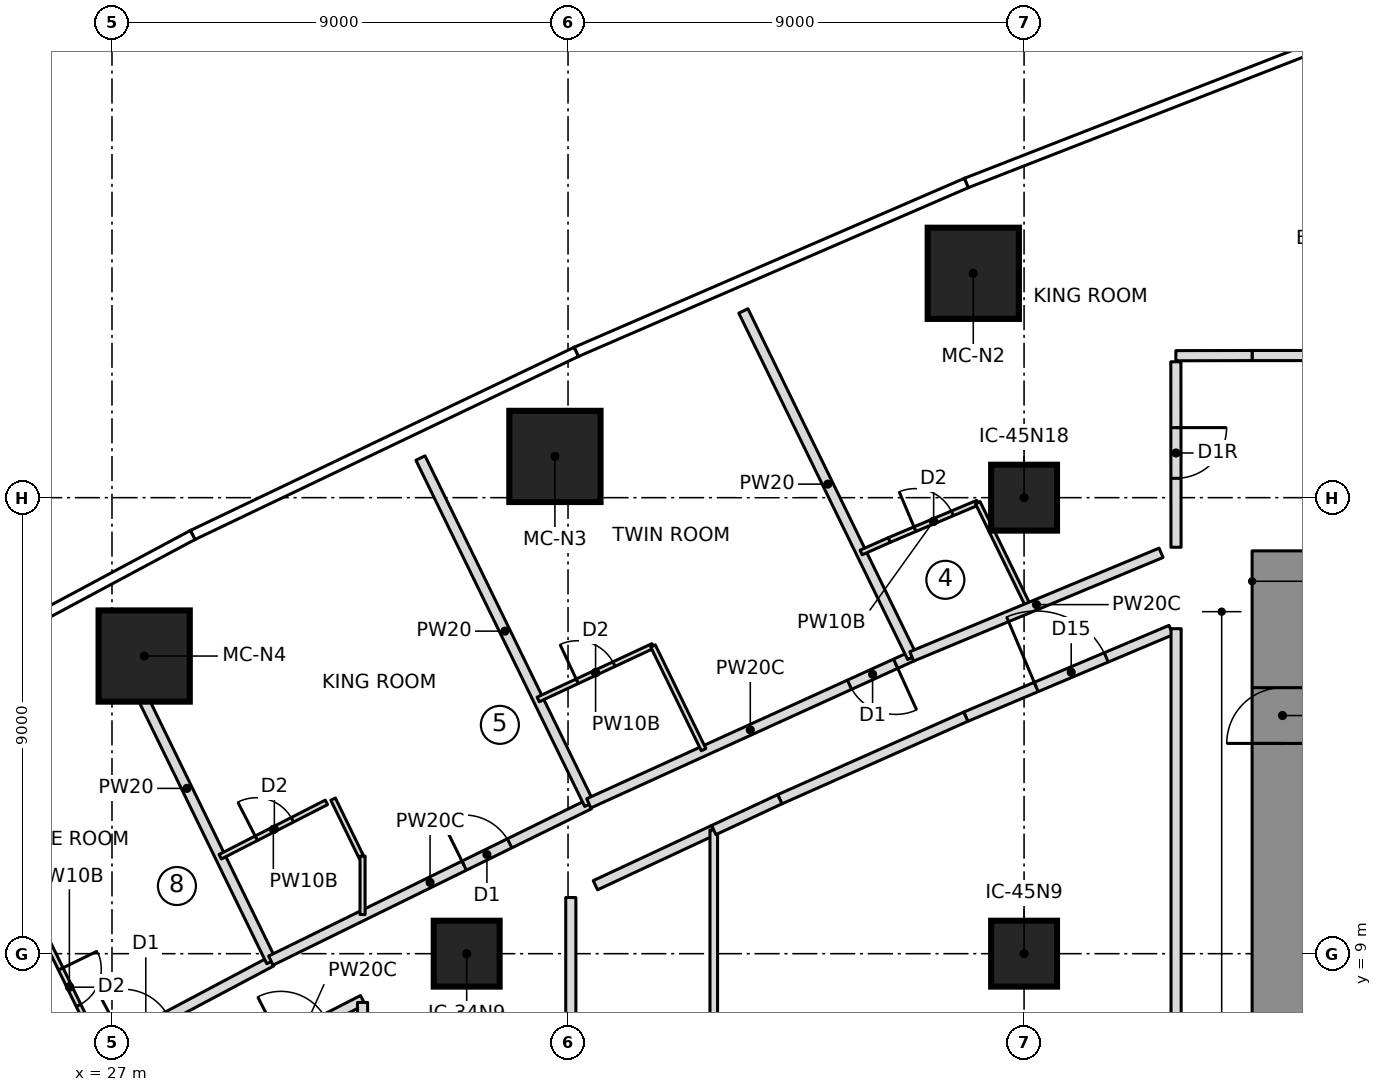
"""IFC4 building model, lengths in metres.
Left out: names, types, materials, properties, quantities, classifications, styles, units other than length and angle.
Written with IfcOpenShell. Run it as: python <this file> out.ifc"""

import sys

from ifc_helpers import new_model, si_unit, direction, frame, frame_2d, origin, origin_2d, place, context, subcontext, project, spatial, rectangle, extrude, element, fill, save


model = new_model("IFC4")
c1 = context("Model", 3, precision=1e-05, world=origin(), true_north=direction((0.0, 1.0)))
c2 = subcontext(c1, "Body", "Model", "MODEL_VIEW")
j1 = project(units=[si_unit("LENGTHUNIT", "METRE"), si_unit("PLANEANGLEUNIT", "RADIAN")], contexts=[c1])
p1 = place(None, origin())
s1 = spatial("IfcSite", under=j1, at=p1, CompositionType="ELEMENT")
p2 = place(p1, origin())
s2 = spatial("IfcBuilding", under=s1, at=p2, CompositionType="ELEMENT")
p3 = place(p2, frame((0.0, 0.0, 68.0)))
s3 = spatial("IfcBuildingStorey", under=s2, at=p3, CompositionType="ELEMENT", Elevation=68.0)
p4 = place(p3, frame((50.1, 6.65, 0.0), z_axis=(0.0, 0.0, 1.0), x_axis=(0.0, 1.0, 0.0)))
e1 = element("IfcWall", 1, at=p4, inside=s3, PredefinedType="SHEAR", context=c2, shape_type="SweptSolid", body=[
    extrude(rectangle(XDim=10.3, YDim=1.2, at=frame_2d((5.15, 0.0))), origin(), (0.0, 0.0, 1.0), 3.55),
])
p5 = place(p4, frame((6.5, 0.0, 0.0)))
e2 = element("IfcOpeningElement", 2, at=p5, cuts=e1, PredefinedType="OPENING", context=c2, shape_type="SweptSolid", body=[
    extrude(rectangle(XDim=1.1, YDim=2.1, at=frame_2d((0.55, 1.05))), frame((0.0, 0.61, 0.0), z_axis=(0.0, -1.0, 0.0), x_axis=(1.0, 0.0, 0.0)), (0.0, 0.0, 1.0), 1.22),
])
for number, where, z_axis, x_axis in (
    (3, (43.998, 22.428, 0.0), (0.0, 0.0, 1.0), (1.0, 0.0, 0.0)),
    (4, (35.741, 18.814, 0.0), (0.0, 0.0, 1.0), (1.0, 0.0, 0.0)),
    (5, (27.635, 14.874, 0.0), (0.0, 0.0, 1.0), (1.0, 0.0, 0.0)),
):
    element("IfcColumn", number, at=place(p3, frame(where, z_axis=z_axis, x_axis=x_axis)), inside=s3, PredefinedType="COLUMN", context=c2, shape_type="SweptSolid", body=[
        extrude(rectangle(XDim=1.8, YDim=1.8, at=origin_2d()), origin(), (0.0, 0.0, 1.0), 3.55),
    ])
for number, where, z_axis, x_axis in (
    (6, (34.0, 9.0, 0.0), (0.0, 0.0, 1.0), (1.0, 0.0, 0.0)),
    (7, (45.0, 9.0, 0.0), (0.0, 0.0, 1.0), (1.0, 0.0, 0.0)),
    (8, (45.0, 18.0, 0.0), (0.0, 0.0, 1.0), (1.0, 0.0, 0.0)),
):
    element("IfcColumn", number, at=place(p3, frame(where, z_axis=z_axis, x_axis=x_axis)), inside=s3, PredefinedType="COLUMN", context=c2, shape_type="SweptSolid", body=[
        extrude(rectangle(XDim=1.3, YDim=1.3, at=origin_2d()), origin(), (0.0, 0.0, 1.0), 3.55),
    ])
p6 = place(p3, frame((23.957, 5.564, 0.0), z_axis=(0.0, 0.0, 1.0), x_axis=(0.883455325405, 0.468515408513, 0.0)))
e9 = element("IfcWall", 9, at=p6, inside=s3, PredefinedType="PARTITIONING", context=c2, shape_type="SweptSolid", body=[
    extrude(rectangle(XDim=7.004, YDim=0.2, at=frame_2d((3.502, 0.0))), origin(), (0.0, 0.0, 1.0), 3.25),
])
p7 = place(p6, frame((3.7, 0.0, 0.0)))
e10 = element("IfcOpeningElement", 10, at=p7, cuts=e9, PredefinedType="OPENING", context=c2, shape_type="SweptSolid", body=[
    extrude(rectangle(XDim=1.0, YDim=2.1, at=frame_2d((0.5, 1.05))), frame((0.0, 0.11, 0.0), z_axis=(0.0, -1.0, 0.0), x_axis=(1.0, 0.0, 0.0)), (0.0, 0.0, 1.0), 0.22),
])
p8 = place(p3, frame((25.55, 9.597, 0.0), z_axis=(0.0, 0.0, 1.0), x_axis=(0.43822975423, -0.898862994292, 0.0)))
e11 = element("IfcWall", 11, at=p8, inside=s3, PredefinedType="PARTITIONING", context=c2, shape_type="SweptSolid", body=[
    extrude(rectangle(XDim=2.779, YDim=0.1, at=frame_2d((1.389, 0.0))), origin(), (0.0, 0.0, 1.0), 3.25),
])
p9 = place(p8, frame((1.0, 0.0, 0.0)))
e12 = element("IfcOpeningElement", 12, at=p9, cuts=e11, PredefinedType="OPENING", context=c2, shape_type="SweptSolid", body=[
    extrude(rectangle(XDim=0.8, YDim=2.1, at=frame_2d((0.4, 1.05))), frame((0.0, 0.06, 0.0), z_axis=(0.0, -1.0, 0.0), x_axis=(1.0, 0.0, 0.0)), (0.0, 0.0, 1.0), 0.12),
])
p10 = place(p3, frame((30.144, 8.846, 0.0), z_axis=(0.0, 0.0, 1.0), x_axis=(-0.438185054829, 0.898884785567, 0.0)))
e13 = element("IfcWall", 13, at=p10, inside=s3, PredefinedType="PARTITIONING", context=c2, shape_type="SweptSolid", body=[
    extrude(rectangle(XDim=7.601, YDim=0.2, at=frame_2d((3.801, 0.0))), origin(), (0.0, 0.0, 1.0), 3.25),
])
p11 = place(p3, frame((30.135, 8.864, 0.0), z_axis=(0.0, 0.0, 1.0), x_axis=(0.897599118183, 0.44081268475, 0.0)))
e14 = element("IfcWall", 14, at=p11, inside=s3, PredefinedType="PARTITIONING", context=c2, shape_type="SweptSolid", body=[
    extrude(rectangle(XDim=7.0, YDim=0.2, at=frame_2d((3.5, 0.0))), origin(), (0.0, 0.0, 1.0), 3.25),
])
p12 = place(p11, frame((4.25, 0.0, 0.0)))
e15 = element("IfcOpeningElement", 15, at=p12, cuts=e14, PredefinedType="OPENING", context=c2, shape_type="SweptSolid", body=[
    extrude(rectangle(XDim=1.0, YDim=2.1, at=frame_2d((0.5, 1.05))), frame((0.0, 0.11, 0.0), z_axis=(0.0, -1.0, 0.0), x_axis=(1.0, 0.0, 0.0)), (0.0, 0.0, 1.0), 0.22),
])
p13 = place(p3, frame((29.136, 10.914, 0.0), z_axis=(0.0, 0.0, 1.0), x_axis=(0.890219804082, 0.45553122881, 0.0)))
e16 = element("IfcWall", 16, at=p13, inside=s3, PredefinedType="PARTITIONING", context=c2, shape_type="SweptSolid", body=[
    extrude(rectangle(XDim=2.354, YDim=0.1, at=frame_2d((1.177, 0.0))), origin(), (0.0, 0.0, 1.0), 3.25),
])
p14 = place(p13, frame((0.8, 0.0, 0.0)))
e17 = element("IfcOpeningElement", 17, at=p14, cuts=e16, PredefinedType="OPENING", context=c2, shape_type="SweptSolid", body=[
    extrude(rectangle(XDim=0.8, YDim=2.1, at=frame_2d((0.4, 1.05))), frame((0.0, 0.06, 0.0), z_axis=(0.0, -1.0, 0.0), x_axis=(1.0, 0.0, 0.0)), (0.0, 0.0, 1.0), 0.12),
])
p15 = place(p3, frame((31.363, 12.05, 0.0), z_axis=(0.0, 0.0, 1.0), x_axis=(0.438356099343, -0.898801385273, 0.0)))
e18 = element("IfcWall", 18, at=p15, inside=s3, PredefinedType="PARTITIONING", context=c2, shape_type="SweptSolid", body=[
    extrude(rectangle(XDim=1.282, YDim=0.1, at=frame_2d((0.641, 0.0))), origin(), (0.0, 0.0, 1.0), 3.25),
])
p16 = place(p3, frame((36.419, 11.949, 0.0), z_axis=(0.0, 0.0, 1.0), x_axis=(-0.438197705697, 0.898878618459, 0.0)))
e19 = element("IfcWall", 19, at=p16, inside=s3, PredefinedType="PARTITIONING", context=c2, shape_type="SweptSolid", body=[
    extrude(rectangle(XDim=7.601, YDim=0.2, at=frame_2d((3.801, 0.0))), origin(), (0.0, 0.0, 1.0), 3.25),
])
p17 = place(p3, frame((42.784, 14.867, 0.0), z_axis=(0.0, 0.0, 1.0), x_axis=(-0.910238677692, -0.414083988622, 0.0)))
e20 = element("IfcWall", 20, at=p17, inside=s3, PredefinedType="PARTITIONING", context=c2, shape_type="SweptSolid", body=[
    extrude(rectangle(XDim=7.003, YDim=0.2, at=frame_2d((3.501, 0.0))), origin(), (0.0, 0.0, 1.0), 3.25),
])
p18 = place(p17, frame((0.35, 0.0, 0.0)))
e21 = element("IfcOpeningElement", 21, at=p18, cuts=e20, PredefinedType="OPENING", context=c2, shape_type="SweptSolid", body=[
    extrude(rectangle(XDim=1.0, YDim=2.1, at=frame_2d((0.5, 1.05))), frame((0.0, 0.11, 0.0), z_axis=(0.0, -1.0, 0.0), x_axis=(1.0, 0.0, 0.0)), (0.0, 0.0, 1.0), 0.22),
])
p19 = place(p3, frame((35.411, 14.017, 0.0), z_axis=(0.0, 0.0, 1.0), x_axis=(0.906317797926, 0.422596792655, 0.0)))
e22 = element("IfcWall", 22, at=p19, inside=s3, PredefinedType="PARTITIONING", context=c2, shape_type="SweptSolid", body=[
    extrude(rectangle(XDim=2.5, YDim=0.1, at=frame_2d((1.25, 0.0))), origin(), (0.0, 0.0, 1.0), 3.25),
])
p20 = place(p19, frame((0.85, 0.0, 0.0)))
e23 = element("IfcOpeningElement", 23, at=p20, cuts=e22, PredefinedType="OPENING", context=c2, shape_type="SweptSolid", body=[
    extrude(rectangle(XDim=0.8, YDim=2.1, at=frame_2d((0.4, 1.05))), frame((0.0, 0.06, 0.0), z_axis=(0.0, -1.0, 0.0), x_axis=(1.0, 0.0, 0.0)), (0.0, 0.0, 1.0), 0.12),
])
p21 = place(p3, frame((37.677, 15.073, 0.0), z_axis=(0.0, 0.0, 1.0), x_axis=(0.43818492173, -0.89888485045, 0.0)))
e24 = element("IfcWall", 24, at=p21, inside=s3, PredefinedType="PARTITIONING", context=c2, shape_type="SweptSolid", body=[
    extrude(rectangle(XDim=2.277, YDim=0.1, at=frame_2d((1.139, 0.0))), origin(), (0.0, 0.0, 1.0), 3.25),
])
p22 = place(p3, frame((42.793, 14.849, 0.0), z_axis=(0.0, 0.0, 1.0), x_axis=(-0.438214892445, 0.898870239823, 0.0)))
e25 = element("IfcWall", 25, at=p22, inside=s3, PredefinedType="PARTITIONING", context=c2, shape_type="SweptSolid", body=[
    extrude(rectangle(XDim=7.605, YDim=0.2, at=frame_2d((3.802, 0.0))), origin(), (0.0, 0.0, 1.0), 3.25),
])
p23 = place(p3, frame((41.784, 16.918, 0.0), z_axis=(0.0, 0.0, 1.0), x_axis=(0.913894320415, 0.405952178357, 0.0)))
e26 = element("IfcWall", 26, at=p23, inside=s3, PredefinedType="PARTITIONING", context=c2, shape_type="SweptSolid", body=[
    extrude(rectangle(XDim=0.608, YDim=0.1, at=frame_2d((0.304, 0.0))), origin(), (0.0, 0.0, 1.0), 3.25),
])
p24 = place(p3, frame((42.34, 17.165, 0.0), z_axis=(0.0, 0.0, 1.0), x_axis=(0.921263923232, 0.38893802045, 0.0)))
e27 = element("IfcWall", 27, at=p24, inside=s3, PredefinedType="PARTITIONING", context=c2, shape_type="SweptSolid", body=[
    extrude(rectangle(XDim=1.895, YDim=0.1, at=frame_2d((0.948, 0.0))), origin(), (0.0, 0.0, 1.0), 3.25),
])
p25 = place(p24, frame((0.55, 0.0, 0.0)))
e28 = element("IfcOpeningElement", 28, at=p25, cuts=e27, PredefinedType="OPENING", context=c2, shape_type="SweptSolid", body=[
    extrude(rectangle(XDim=0.8, YDim=2.1, at=frame_2d((0.4, 1.05))), frame((0.0, 0.06, 0.0), z_axis=(0.0, -1.0, 0.0), x_axis=(1.0, 0.0, 0.0)), (0.0, 0.0, 1.0), 0.12),
])
p26 = place(p3, frame((44.086, 17.902, 0.0), z_axis=(0.0, 0.0, 1.0), x_axis=(0.438279975423, -0.898838507822, 0.0)))
e29 = element("IfcWall", 29, at=p26, inside=s3, PredefinedType="PARTITIONING", context=c2, shape_type="SweptSolid", body=[
    extrude(rectangle(XDim=0.603, YDim=0.1, at=frame_2d((0.301, 0.0))), origin(), (0.0, 0.0, 1.0), 3.25),
])
p27 = place(p3, frame((44.355, 17.35, 0.0), z_axis=(0.0, 0.0, 1.0), x_axis=(0.438227394636, -0.89886414468, 0.0)))
e30 = element("IfcWall", 30, at=p27, inside=s3, PredefinedType="PARTITIONING", context=c2, shape_type="SweptSolid", body=[
    extrude(rectangle(XDim=1.667, YDim=0.1, at=frame_2d((0.833, 0.0))), origin(), (0.0, 0.0, 1.0), 3.25),
])
p28 = place(p3, frame((29.604, 6.884, 0.0), z_axis=(0.0, 0.0, 1.0), x_axis=(0.890220210981, 0.455530433628, 0.0)))
e31 = element("IfcWall", 31, at=p28, inside=s3, PredefinedType="PARTITIONING", context=c2, shape_type="SweptSolid", body=[
    extrude(rectangle(XDim=2.636, YDim=0.2, at=frame_2d((1.318, 0.0))), origin(), (0.0, 0.0, 1.0), 3.25),
])
p29 = place(p28, frame((0.818, 0.0, 0.0)))
e32 = element("IfcOpeningElement", 32, at=p29, cuts=e31, PredefinedType="OPENING", context=c2, shape_type="SweptSolid", body=[
    extrude(rectangle(XDim=1.0, YDim=2.1, at=frame_2d((0.5, 1.05))), frame((0.0, 0.11, 0.0), z_axis=(0.0, -1.0, 0.0), x_axis=(1.0, 0.0, 0.0)), (0.0, 0.0, 1.0), 0.22),
])
p30 = place(p3, frame((36.54, 10.351, 0.0), z_axis=(0.0, 0.0, 1.0), x_axis=(0.906347616376, 0.422532836937, 0.0)))
e33 = element("IfcWall", 33, at=p30, inside=s3, PredefinedType="PARTITIONING", context=c2, shape_type="SweptSolid", body=[
    extrude(rectangle(XDim=2.578, YDim=0.2, at=frame_2d((1.289, 0.0))), origin(), (0.0, 0.0, 1.0), 3.25),
])
p31 = place(p3, frame((38.876, -11.44, 0.0), z_axis=(0.0, 0.0, 1.0), x_axis=(0.0, 1.0, 0.0)))
e34 = element("IfcWall", 34, at=p31, inside=s3, PredefinedType="PARTITIONING", context=c2, shape_type="SweptSolid", body=[
    extrude(rectangle(XDim=22.88, YDim=0.15, at=frame_2d((11.44, 0.0))), origin(), (0.0, 0.0, 1.0), 3.25),
])
p32 = place(p3, frame((43.85, 13.677, 0.0), z_axis=(0.0, 0.0, 1.0), x_axis=(0.921265924084, 0.388933281068, 0.0)))
e35 = element("IfcWall", 35, at=p32, inside=s3, PredefinedType="PARTITIONING", context=c2, shape_type="SweptSolid", body=[
    extrude(rectangle(XDim=4.396, YDim=0.2, at=frame_2d((2.198, 0.0))), origin(), (0.0, 0.0, 1.0), 3.25),
])
p33 = place(p32, frame((1.508, 0.0, 0.0)))
e36 = element("IfcOpeningElement", 36, at=p33, cuts=e35, PredefinedType="OPENING", context=c2, shape_type="SweptSolid", body=[
    extrude(rectangle(XDim=1.5, YDim=2.1, at=frame_2d((0.75, 1.05))), frame((0.0, 0.11, 0.0), z_axis=(0.0, -1.0, 0.0), x_axis=(1.0, 0.0, 0.0)), (0.0, 0.0, 1.0), 0.22),
])
p34 = place(p3, frame((40.18, 12.048, 0.0), z_axis=(0.0, 0.0, 1.0), x_axis=(0.913986953061, 0.405743576209, 0.0)))
e37 = element("IfcWall", 37, at=p34, inside=s3, PredefinedType="PARTITIONING", context=c2, shape_type="SweptSolid", body=[
    extrude(rectangle(XDim=4.016, YDim=0.2, at=frame_2d((2.008, 0.0))), origin(), (0.0, 0.0, 1.0), 3.25),
])
p35 = place(p3, frame((38.876, 11.44, 0.0), z_axis=(0.0, 0.0, 1.0), x_axis=(0.906347874546, 0.422532283152, 0.0)))
e38 = element("IfcWall", 38, at=p35, inside=s3, PredefinedType="PARTITIONING", context=c2, shape_type="SweptSolid", body=[
    extrude(rectangle(XDim=1.438, YDim=0.2, at=frame_2d((0.719, 0.0))), origin(), (0.0, 0.0, 1.0), 3.25),
])
p36 = place(p3, frame((54.597, 20.805, 0.0), z_axis=(0.0, 0.0, 1.0), x_axis=(-1.0, 0.0, 0.0)))
e39 = element("IfcWall", 39, at=p36, inside=s3, PredefinedType="PARTITIONING", context=c2, shape_type="SweptSolid", body=[
    extrude(rectangle(XDim=5.097, YDim=0.2, at=frame_2d((2.548, 0.0))), origin(), (0.0, 0.0, 1.0), 3.25),
])
p37 = place(p36, frame((2.048, 0.0, 0.0)))
e40 = element("IfcOpeningElement", 40, at=p37, cuts=e39, PredefinedType="OPENING", context=c2, shape_type="SweptSolid", body=[
    extrude(rectangle(XDim=1.5, YDim=2.1, at=frame_2d((0.75, 1.05))), frame((0.0, 0.11, 0.0), z_axis=(0.0, -1.0, 0.0), x_axis=(1.0, 0.0, 0.0)), (0.0, 0.0, 1.0), 0.22),
])
p38 = place(p3, frame((31.945, 10.926, 0.0), z_axis=(0.0, 0.0, 1.0), x_axis=(0.0, -1.0, 0.0)))
e41 = element("IfcWall", 41, at=p38, inside=s3, PredefinedType="PARTITIONING", context=c2, shape_type="SweptSolid", body=[
    extrude(rectangle(XDim=1.153, YDim=0.1, at=frame_2d((0.576, 0.0))), origin(), (0.0, 0.0, 1.0), 3.25),
])
p39 = place(p3, frame((47.704, 16.911, 0.0), z_axis=(0.0, 0.0, 1.0), x_axis=(-0.923461497361, -0.383691103484, 0.0)))
e42 = element("IfcWall", 42, at=p39, inside=s3, PredefinedType="PARTITIONING", context=c2, shape_type="SweptSolid", body=[
    extrude(rectangle(XDim=5.328, YDim=0.2, at=frame_2d((2.664, 0.0))), origin(), (0.0, 0.0, 1.0), 3.25),
])
p40 = place(p3, frame((31.945, 8.037, 0.0), z_axis=(0.0, 0.0, 1.0), x_axis=(0.003129875123, -0.999995101929, 0.0)))
e43 = element("IfcWall", 43, at=p40, inside=s3, PredefinedType="PARTITIONING", context=c2, shape_type="SweptSolid", body=[
    extrude(rectangle(XDim=1.092, YDim=0.2, at=frame_2d((0.546, 0.0))), origin(), (0.0, 0.0, 1.0), 3.25),
])
p41 = place(p3, frame((36.055, 6.95, 0.0), z_axis=(0.0, 0.0, 1.0), x_axis=(0.0, 1.0, 0.0)))
e44 = element("IfcWall", 44, at=p41, inside=s3, PredefinedType="PARTITIONING", context=c2, shape_type="SweptSolid", body=[
    extrude(rectangle(XDim=3.158, YDim=0.2, at=frame_2d((1.579, 0.0))), origin(), (0.0, 0.0, 1.0), 3.25),
])
p42 = place(p3, frame((48.0, 15.414, 0.0), z_axis=(0.0, 0.0, 1.0), x_axis=(0.0, -1.0, 0.0)))
e45 = element("IfcWall", 45, at=p42, inside=s3, PredefinedType="PARTITIONING", context=c2, shape_type="SweptSolid", body=[
    extrude(rectangle(XDim=30.828, YDim=0.2, at=frame_2d((15.414, 0.0))), origin(), (0.0, 0.0, 1.0), 3.25),
])
p43 = place(p3, frame((49.5, 20.805, 0.0), z_axis=(0.0, 0.0, 1.0), x_axis=(-0.999998104399, -0.001947099992, 0.0)))
e46 = element("IfcWall", 46, at=p43, inside=s3, PredefinedType="PARTITIONING", context=c2, shape_type="SweptSolid", body=[
    extrude(rectangle(XDim=1.505, YDim=0.2, at=frame_2d((0.752, 0.0))), origin(), (0.0, 0.0, 1.0), 3.25),
])
p44 = place(p3, frame((47.996, 20.682, 0.0), z_axis=(0.0, 0.0, 1.0), x_axis=(0.000866955326, -0.999999624194, 0.0)))
e47 = element("IfcWall", 47, at=p44, inside=s3, PredefinedType="PARTITIONING", context=c2, shape_type="SweptSolid", body=[
    extrude(rectangle(XDim=3.661, YDim=0.2, at=frame_2d((1.831, 0.0))), origin(), (0.0, 0.0, 1.0), 3.25),
])
p45 = place(p44, frame((1.3, 0.0, 0.0)))
e48 = element("IfcOpeningElement", 48, at=p45, cuts=e47, PredefinedType="OPENING", context=c2, shape_type="SweptSolid", body=[
    extrude(rectangle(XDim=1.0, YDim=2.1, at=frame_2d((0.5, 1.05))), frame((0.0, 0.11, 0.0), z_axis=(0.0, -1.0, 0.0), x_axis=(1.0, 0.0, 0.0)), (0.0, 0.0, 1.0), 0.22),
])
p46 = place(p9, origin())
e49 = element("IfcDoor", 49, at=p46, inside=s3, OperationType="SINGLE_SWING_LEFT", PredefinedType="DOOR", context=c2, shape_type="SweptSolid", body=[
    extrude(rectangle(XDim=0.8, YDim=2.1, at=frame_2d((0.4, 1.05))), frame((0.0, 0.025, 0.0), z_axis=(0.0, -1.0, 0.0), x_axis=(1.0, 0.0, 0.0)), (0.0, 0.0, 1.0), 0.05),
])
fill(e12, e49)
p47 = place(p14, origin())
e50 = element("IfcDoor", 50, at=p47, inside=s3, OperationType="SINGLE_SWING_LEFT", PredefinedType="DOOR", context=c2, shape_type="SweptSolid", body=[
    extrude(rectangle(XDim=0.8, YDim=2.1, at=frame_2d((0.4, 1.05))), frame((0.0, 0.025, 0.0), z_axis=(0.0, -1.0, 0.0), x_axis=(1.0, 0.0, 0.0)), (0.0, 0.0, 1.0), 0.05),
])
fill(e17, e50)
p48 = place(p12, origin())
e51 = element("IfcDoor", 51, at=p48, inside=s3, OperationType="SINGLE_SWING_LEFT", PredefinedType="DOOR", context=c2, shape_type="SweptSolid", body=[
    extrude(rectangle(XDim=1.0, YDim=2.1, at=frame_2d((0.5, 1.05))), frame((0.0, 0.025, 0.0), z_axis=(0.0, -1.0, 0.0), x_axis=(1.0, 0.0, 0.0)), (0.0, 0.0, 1.0), 0.05),
])
fill(e15, e51)
p49 = place(p20, origin())
e52 = element("IfcDoor", 52, at=p49, inside=s3, OperationType="SINGLE_SWING_LEFT", PredefinedType="DOOR", context=c2, shape_type="SweptSolid", body=[
    extrude(rectangle(XDim=0.8, YDim=2.1, at=frame_2d((0.4, 1.05))), frame((0.0, 0.025, 0.0), z_axis=(0.0, -1.0, 0.0), x_axis=(1.0, 0.0, 0.0)), (0.0, 0.0, 1.0), 0.05),
])
fill(e23, e52)
p50 = place(p18, origin())
e53 = element("IfcDoor", 53, at=p50, inside=s3, OperationType="SINGLE_SWING_LEFT", PredefinedType="DOOR", context=c2, shape_type="SweptSolid", body=[
    extrude(rectangle(XDim=1.0, YDim=2.1, at=frame_2d((0.5, 1.05))), frame((0.0, 0.025, 0.0), z_axis=(0.0, -1.0, 0.0), x_axis=(1.0, 0.0, 0.0)), (0.0, 0.0, 1.0), 0.05),
])
fill(e21, e53)
p51 = place(p25, origin())
e54 = element("IfcDoor", 54, at=p51, inside=s3, OperationType="SINGLE_SWING_LEFT", PredefinedType="DOOR", context=c2, shape_type="SweptSolid", body=[
    extrude(rectangle(XDim=0.8, YDim=2.1, at=frame_2d((0.4, 1.05))), frame((0.0, 0.025, 0.0), z_axis=(0.0, -1.0, 0.0), x_axis=(1.0, 0.0, 0.0)), (0.0, 0.0, 1.0), 0.05),
])
fill(e28, e54)
p52 = place(p33, origin())
e55 = element("IfcDoor", 55, at=p52, inside=s3, OperationType="DOUBLE_DOOR_SINGLE_SWING", PredefinedType="DOOR", context=c2, shape_type="SweptSolid", body=[
    extrude(rectangle(XDim=1.5, YDim=2.1, at=frame_2d((0.75, 1.05))), frame((0.0, 0.025, 0.0), z_axis=(0.0, -1.0, 0.0), x_axis=(1.0, 0.0, 0.0)), (0.0, 0.0, 1.0), 0.05),
])
fill(e36, e55)
p53 = place(p45, origin())
e56 = element("IfcDoor", 56, at=p53, inside=s3, OperationType="SINGLE_SWING_RIGHT", PredefinedType="DOOR", context=c2, shape_type="SweptSolid", body=[
    extrude(rectangle(XDim=1.0, YDim=2.1, at=frame_2d((0.5, 1.05))), frame((0.0, 0.025, 0.0), z_axis=(0.0, -1.0, 0.0), x_axis=(1.0, 0.0, 0.0)), (0.0, 0.0, 1.0), 0.05),
])
fill(e48, e56)
p54 = place(p5, origin())
e57 = element("IfcDoor", 57, at=p54, inside=s3, OperationType="SINGLE_SWING_RIGHT", PredefinedType="DOOR", context=c2, shape_type="SweptSolid", body=[
    extrude(rectangle(XDim=1.1, YDim=2.1, at=frame_2d((0.55, 1.05))), frame((0.0, 0.025, 0.0), z_axis=(0.0, -1.0, 0.0), x_axis=(1.0, 0.0, 0.0)), (0.0, 0.0, 1.0), 0.05),
])
fill(e2, e57)
save(model, sys.argv[1])
